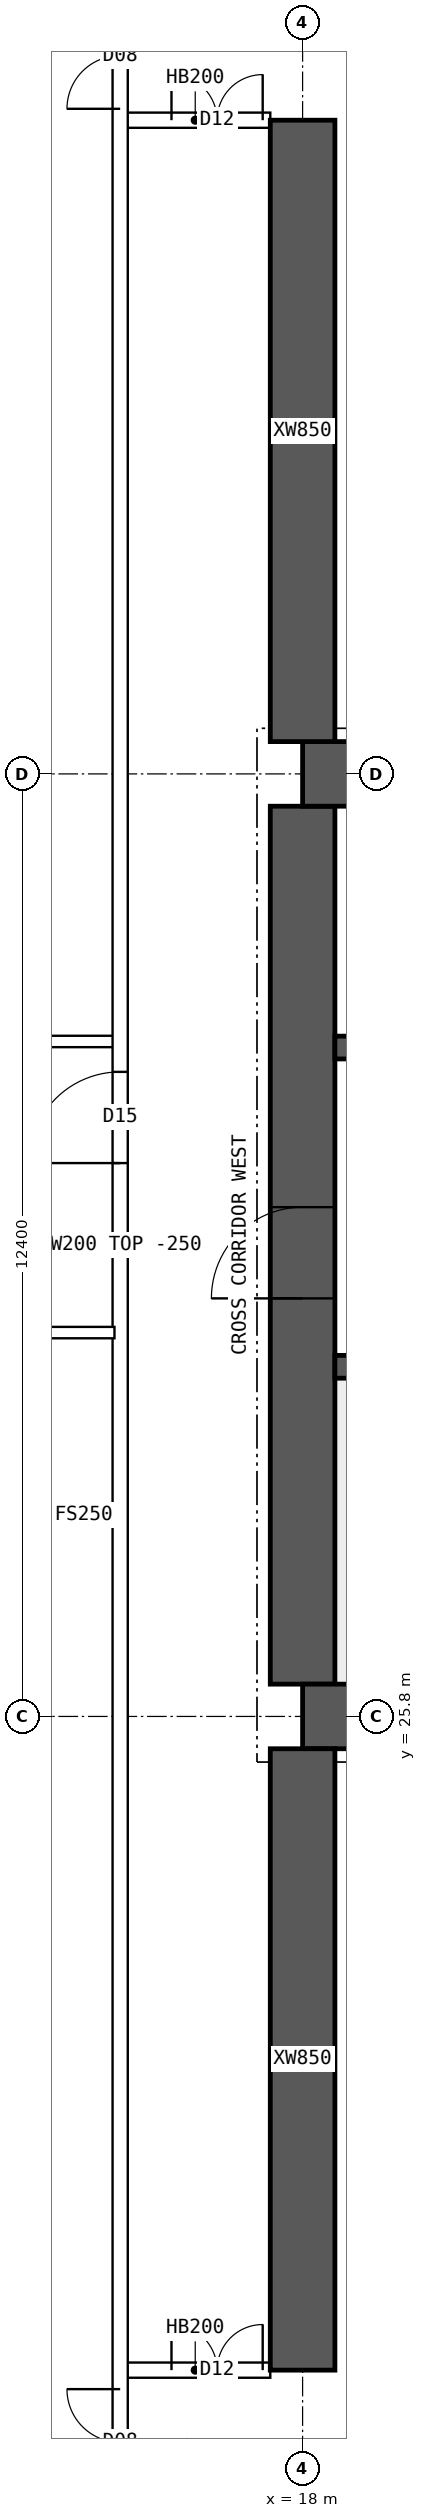
"""IFC4 building model, lengths in metres.
Left out: names, types, materials, properties, quantities, classifications, styles, units other than length and angle.
Written with IfcOpenShell. Run it as: python <this file> out.ifc"""

import sys

from ifc_helpers import new_model, si_unit, direction, frame, frame_2d, origin, place, context, subcontext, project, spatial, polyline, rectangle, outline, extrude, element, fill, save


model = new_model("IFC4")
c1 = context("Model", 3, precision=1e-05, world=origin(), true_north=direction((0.0, 1.0)))
c2 = subcontext(c1, "Body", "Model", "MODEL_VIEW")
j1 = project(units=[si_unit("LENGTHUNIT", "METRE"), si_unit("PLANEANGLEUNIT", "RADIAN")], contexts=[c1])
p1 = place(None, origin())
s1 = spatial("IfcSite", under=j1, at=p1, CompositionType="ELEMENT")
p2 = place(p1, origin())
s2 = spatial("IfcBuilding", under=s1, at=p2, CompositionType="ELEMENT")
p3 = place(p2, frame((0.0, 0.0, 186.1)))
s3 = spatial("IfcBuildingStorey", under=s2, at=p3, CompositionType="ELEMENT", Elevation=186.1)
for number, where, z_axis, x_axis in (
    (1, (18.0, 25.8, 0.0), (0.0, 0.0, 1.0), (1.0, 0.0, 0.0)),
    (2, (18.0, 38.2, 0.0), (0.0, 0.0, 1.0), (1.0, 0.0, 0.0)),
):
    element("IfcWall", number, at=place(p3, frame(where, z_axis=z_axis, x_axis=x_axis)), inside=s3, PredefinedType="SHEAR", context=c2, shape_type="SweptSolid", body=[
        extrude(rectangle(XDim=48.0, YDim=0.85, at=frame_2d((24.0, 0.0))), origin(), (0.0, 0.0, 1.0), 3.75),
    ])
p4 = place(p3, frame((18.0, 26.225, 0.0), z_axis=(0.0, 0.0, 1.0), x_axis=(0.0, 1.0, 0.0)))
e3 = element("IfcWall", 3, at=p4, inside=s3, PredefinedType="SHEAR", context=c2, shape_type="SweptSolid", body=[
    extrude(rectangle(XDim=11.55, YDim=0.85, at=frame_2d((5.775, 0.0))), origin(), (0.0, 0.0, 1.0), 3.75),
])
p5 = place(p4, frame((5.075, 0.0, 0.0)))
e4 = element("IfcOpeningElement", 4, at=p5, cuts=e3, PredefinedType="OPENING", context=c2, shape_type="SweptSolid", body=[
    extrude(rectangle(XDim=1.2, YDim=2.1, at=frame_2d((0.6, 1.05))), frame((0.0, 0.435, 0.0), z_axis=(0.0, -1.0, 0.0), x_axis=(1.0, 0.0, 0.0)), (0.0, 0.0, 1.0), 0.87),
])
p6 = place(p3, frame((18.425, 30.4, 0.0), z_axis=(0.0, 0.0, 1.0), x_axis=(1.0, 0.0, 0.0)))
e5 = element("IfcWall", 5, at=p6, inside=s3, PredefinedType="SHEAR", context=c2, shape_type="SweptSolid", body=[
    extrude(rectangle(XDim=47.15, YDim=0.3, at=frame_2d((23.575, 0.0))), origin(), (0.0, 0.0, 1.0), 3.75),
])
p7 = place(p6, frame((0.4, 0.0, 0.0)))
e6 = element("IfcOpeningElement", 6, at=p7, cuts=e5, PredefinedType="OPENING", context=c2, shape_type="SweptSolid", body=[
    extrude(rectangle(XDim=1.0, YDim=2.1, at=frame_2d((0.5, 1.05))), frame((0.0, 0.16, 0.0), z_axis=(0.0, -1.0, 0.0), x_axis=(1.0, 0.0, 0.0)), (0.0, 0.0, 1.0), 0.32),
])
p8 = place(p6, frame((45.75, 0.0, 0.0)))
e7 = element("IfcOpeningElement", 7, at=p8, cuts=e5, PredefinedType="OPENING", context=c2, shape_type="SweptSolid", body=[
    extrude(rectangle(XDim=1.0, YDim=2.1, at=frame_2d((0.5, 1.05))), frame((0.0, 0.16, 0.0), z_axis=(0.0, -1.0, 0.0), x_axis=(1.0, 0.0, 0.0)), (0.0, 0.0, 1.0), 0.32),
])
p9 = place(p6, frame((8.325, 0.0, 0.0)))
e8 = element("IfcOpeningElement", 8, at=p9, cuts=e5, PredefinedType="OPENING", context=c2, shape_type="SweptSolid", body=[
    extrude(rectangle(XDim=1.1, YDim=2.1, at=frame_2d((0.55, 1.05))), frame((0.0, 0.16, 0.0), z_axis=(0.0, -1.0, 0.0), x_axis=(1.0, 0.0, 0.0)), (0.0, 0.0, 1.0), 0.32),
])
p10 = place(p6, frame((10.925, 0.0, 0.0)))
e9 = element("IfcOpeningElement", 9, at=p10, cuts=e5, PredefinedType="OPENING", context=c2, shape_type="SweptSolid", body=[
    extrude(rectangle(XDim=1.1, YDim=2.1, at=frame_2d((0.55, 1.05))), frame((0.0, 0.16, 0.0), z_axis=(0.0, -1.0, 0.0), x_axis=(1.0, 0.0, 0.0)), (0.0, 0.0, 1.0), 0.32),
])
p11 = place(p6, frame((13.525, 0.0, 0.0)))
e10 = element("IfcOpeningElement", 10, at=p11, cuts=e5, PredefinedType="OPENING", context=c2, shape_type="SweptSolid", body=[
    extrude(rectangle(XDim=1.1, YDim=2.1, at=frame_2d((0.55, 1.05))), frame((0.0, 0.16, 0.0), z_axis=(0.0, -1.0, 0.0), x_axis=(1.0, 0.0, 0.0)), (0.0, 0.0, 1.0), 0.32),
])
p12 = place(p6, frame((16.125, 0.0, 0.0)))
e11 = element("IfcOpeningElement", 11, at=p12, cuts=e5, PredefinedType="OPENING", context=c2, shape_type="SweptSolid", body=[
    extrude(rectangle(XDim=1.1, YDim=2.1, at=frame_2d((0.55, 1.05))), frame((0.0, 0.16, 0.0), z_axis=(0.0, -1.0, 0.0), x_axis=(1.0, 0.0, 0.0)), (0.0, 0.0, 1.0), 0.32),
])
p13 = place(p6, frame((18.9, 0.0, 0.0)))
e12 = element("IfcOpeningElement", 12, at=p13, cuts=e5, PredefinedType="OPENING", context=c2, shape_type="SweptSolid", body=[
    extrude(rectangle(XDim=0.9, YDim=2.1, at=frame_2d((0.45, 1.05))), frame((0.0, 0.16, 0.0), z_axis=(0.0, -1.0, 0.0), x_axis=(1.0, 0.0, 0.0)), (0.0, 0.0, 1.0), 0.32),
])
p14 = place(p6, frame((30.192, 0.0, 0.0)))
e13 = element("IfcOpeningElement", 13, at=p14, cuts=e5, PredefinedType="OPENING", context=c2, shape_type="SweptSolid", body=[
    extrude(rectangle(XDim=1.1, YDim=2.1, at=frame_2d((0.55, 1.05))), frame((0.0, 0.16, 0.0), z_axis=(0.0, -1.0, 0.0), x_axis=(1.0, 0.0, 0.0)), (0.0, 0.0, 1.0), 0.32),
])
p15 = place(p6, frame((33.725, 0.0, 0.0)))
e14 = element("IfcOpeningElement", 14, at=p15, cuts=e5, PredefinedType="OPENING", context=c2, shape_type="SweptSolid", body=[
    extrude(rectangle(XDim=1.1, YDim=2.1, at=frame_2d((0.55, 1.05))), frame((0.0, 0.16, 0.0), z_axis=(0.0, -1.0, 0.0), x_axis=(1.0, 0.0, 0.0)), (0.0, 0.0, 1.0), 0.32),
])
p16 = place(p6, frame((37.258, 0.0, 0.0)))
e15 = element("IfcOpeningElement", 15, at=p16, cuts=e5, PredefinedType="OPENING", context=c2, shape_type="SweptSolid", body=[
    extrude(rectangle(XDim=1.1, YDim=2.1, at=frame_2d((0.55, 1.05))), frame((0.0, 0.16, 0.0), z_axis=(0.0, -1.0, 0.0), x_axis=(1.0, 0.0, 0.0)), (0.0, 0.0, 1.0), 0.32),
])
p17 = place(p3, frame((18.425, 34.6, 0.0), z_axis=(0.0, 0.0, 1.0), x_axis=(1.0, 0.0, 0.0)))
e16 = element("IfcWall", 16, at=p17, inside=s3, PredefinedType="SHEAR", context=c2, shape_type="SweptSolid", body=[
    extrude(rectangle(XDim=47.15, YDim=0.3, at=frame_2d((23.575, 0.0))), origin(), (0.0, 0.0, 1.0), 3.75),
])
p18 = place(p17, frame((0.9, 0.0, 0.0)))
e17 = element("IfcOpeningElement", 17, at=p18, cuts=e16, PredefinedType="OPENING", context=c2, shape_type="SweptSolid", body=[
    extrude(rectangle(XDim=1.1, YDim=2.1, at=frame_2d((0.55, 1.05))), frame((0.0, 0.16, 0.0), z_axis=(0.0, -1.0, 0.0), x_axis=(1.0, 0.0, 0.0)), (0.0, 0.0, 1.0), 0.32),
])
p19 = place(p17, frame((45.15, 0.0, 0.0)))
e18 = element("IfcOpeningElement", 18, at=p19, cuts=e16, PredefinedType="OPENING", context=c2, shape_type="SweptSolid", body=[
    extrude(rectangle(XDim=1.1, YDim=2.1, at=frame_2d((0.55, 1.05))), frame((0.0, 0.16, 0.0), z_axis=(0.0, -1.0, 0.0), x_axis=(1.0, 0.0, 0.0)), (0.0, 0.0, 1.0), 0.32),
])
p20 = place(p17, frame((4.175, 0.0, 0.0)))
e19 = element("IfcOpeningElement", 19, at=p20, cuts=e16, PredefinedType="OPENING", context=c2, shape_type="SweptSolid", body=[
    extrude(rectangle(XDim=0.9, YDim=2.1, at=frame_2d((0.45, 1.05))), frame((0.0, 0.16, 0.0), z_axis=(0.0, -1.0, 0.0), x_axis=(1.0, 0.0, 0.0)), (0.0, 0.0, 1.0), 0.32),
])
p21 = place(p17, frame((42.075, 0.0, 0.0)))
e20 = element("IfcOpeningElement", 20, at=p21, cuts=e16, PredefinedType="OPENING", context=c2, shape_type="SweptSolid", body=[
    extrude(rectangle(XDim=0.9, YDim=2.1, at=frame_2d((0.45, 1.05))), frame((0.0, 0.16, 0.0), z_axis=(0.0, -1.0, 0.0), x_axis=(1.0, 0.0, 0.0)), (0.0, 0.0, 1.0), 0.32),
])
p22 = place(p17, frame((8.95, 0.0, 0.0)))
e21 = element("IfcOpeningElement", 21, at=p22, cuts=e16, PredefinedType="OPENING", context=c2, shape_type="SweptSolid", body=[
    extrude(rectangle(XDim=0.9, YDim=2.1, at=frame_2d((0.45, 1.05))), frame((0.0, 0.16, 0.0), z_axis=(0.0, -1.0, 0.0), x_axis=(1.0, 0.0, 0.0)), (0.0, 0.0, 1.0), 0.32),
])
p23 = place(p17, frame((12.924, 0.0, 0.0)))
e22 = element("IfcOpeningElement", 22, at=p23, cuts=e16, PredefinedType="OPENING", context=c2, shape_type="SweptSolid", body=[
    extrude(rectangle(XDim=0.9, YDim=2.1, at=frame_2d((0.45, 1.05))), frame((0.0, 0.16, 0.0), z_axis=(0.0, -1.0, 0.0), x_axis=(1.0, 0.0, 0.0)), (0.0, 0.0, 1.0), 0.32),
])
p24 = place(p17, frame((16.571, 0.0, 0.0)))
e23 = element("IfcOpeningElement", 23, at=p24, cuts=e16, PredefinedType="OPENING", context=c2, shape_type="SweptSolid", body=[
    extrude(rectangle(XDim=0.9, YDim=2.1, at=frame_2d((0.45, 1.05))), frame((0.0, 0.16, 0.0), z_axis=(0.0, -1.0, 0.0), x_axis=(1.0, 0.0, 0.0)), (0.0, 0.0, 1.0), 0.32),
])
p25 = place(p17, frame((20.33, 0.0, 0.0)))
e24 = element("IfcOpeningElement", 24, at=p25, cuts=e16, PredefinedType="OPENING", context=c2, shape_type="SweptSolid", body=[
    extrude(rectangle(XDim=0.9, YDim=2.1, at=frame_2d((0.45, 1.05))), frame((0.0, 0.16, 0.0), z_axis=(0.0, -1.0, 0.0), x_axis=(1.0, 0.0, 0.0)), (0.0, 0.0, 1.0), 0.32),
])
p26 = place(p17, frame((24.736, 0.0, 0.0)))
e25 = element("IfcOpeningElement", 25, at=p26, cuts=e16, PredefinedType="OPENING", context=c2, shape_type="SweptSolid", body=[
    extrude(rectangle(XDim=0.9, YDim=2.1, at=frame_2d((0.45, 1.05))), frame((0.0, 0.16, 0.0), z_axis=(0.0, -1.0, 0.0), x_axis=(1.0, 0.0, 0.0)), (0.0, 0.0, 1.0), 0.32),
])
p27 = place(p17, frame((27.533, 0.0, 0.0)))
e26 = element("IfcOpeningElement", 26, at=p27, cuts=e16, PredefinedType="OPENING", context=c2, shape_type="SweptSolid", body=[
    extrude(rectangle(XDim=0.9, YDim=2.1, at=frame_2d((0.45, 1.05))), frame((0.0, 0.16, 0.0), z_axis=(0.0, -1.0, 0.0), x_axis=(1.0, 0.0, 0.0)), (0.0, 0.0, 1.0), 0.32),
])
p28 = place(p17, frame((30.716, 0.0, 0.0)))
e27 = element("IfcOpeningElement", 27, at=p28, cuts=e16, PredefinedType="OPENING", context=c2, shape_type="SweptSolid", body=[
    extrude(rectangle(XDim=0.9, YDim=2.1, at=frame_2d((0.45, 1.05))), frame((0.0, 0.16, 0.0), z_axis=(0.0, -1.0, 0.0), x_axis=(1.0, 0.0, 0.0)), (0.0, 0.0, 1.0), 0.32),
])
p29 = place(p17, frame((34.667, 0.0, 0.0)))
e28 = element("IfcOpeningElement", 28, at=p29, cuts=e16, PredefinedType="OPENING", context=c2, shape_type="SweptSolid", body=[
    extrude(rectangle(XDim=0.9, YDim=2.1, at=frame_2d((0.45, 1.05))), frame((0.0, 0.16, 0.0), z_axis=(0.0, -1.0, 0.0), x_axis=(1.0, 0.0, 0.0)), (0.0, 0.0, 1.0), 0.32),
])
p30 = place(p17, frame((37.605, 0.0, 0.0)))
e29 = element("IfcOpeningElement", 29, at=p30, cuts=e16, PredefinedType="OPENING", context=c2, shape_type="SweptSolid", body=[
    extrude(rectangle(XDim=0.9, YDim=2.1, at=frame_2d((0.45, 1.05))), frame((0.0, 0.16, 0.0), z_axis=(0.0, -1.0, 0.0), x_axis=(1.0, 0.0, 0.0)), (0.0, 0.0, 1.0), 0.32),
])
for number, where, z_axis, x_axis in (
    (30, (18.0, 17.2, 0.0), (0.0, 0.0, 1.0), (0.0, 1.0, 0.0)),
    (31, (18.0, 38.625, 0.0), (0.0, 0.0, 1.0), (0.0, 1.0, 0.0)),
):
    element("IfcWall", number, at=place(p3, frame(where, z_axis=z_axis, x_axis=x_axis)), inside=s3, PredefinedType="SHEAR", context=c2, shape_type="SweptSolid", body=[
        extrude(rectangle(XDim=8.175, YDim=0.85, at=frame_2d((4.087, 0.0))), origin(), (0.0, 0.0, 1.0), 3.75),
    ])
p31 = place(p3, frame((15.6, 17.2, 0.0), z_axis=(0.0, 0.0, 1.0), x_axis=(1.0, 0.0, 0.0)))
e32 = element("IfcWall", 32, at=p31, inside=s3, PredefinedType="SOLIDWALL", context=c2, shape_type="SweptSolid", body=[
    extrude(rectangle(XDim=1.975, YDim=0.2, at=frame_2d((0.987, 0.0))), origin(), (0.0, 0.0, 1.0), 3.5),
])
p32 = place(p31, frame((0.675, 0.0, 0.0)))
e33 = element("IfcOpeningElement", 33, at=p32, cuts=e32, PredefinedType="OPENING", context=c2, shape_type="SweptSolid", body=[
    extrude(rectangle(XDim=1.2, YDim=2.1, at=frame_2d((0.6, 1.05))), frame((0.0, 0.11, 0.0), z_axis=(0.0, -1.0, 0.0), x_axis=(1.0, 0.0, 0.0)), (0.0, 0.0, 1.0), 0.22),
])
p33 = place(p3, frame((15.6, 46.8, 0.0), z_axis=(0.0, 0.0, 1.0), x_axis=(1.0, 0.0, 0.0)))
e34 = element("IfcWall", 34, at=p33, inside=s3, PredefinedType="SOLIDWALL", context=c2, shape_type="SweptSolid", body=[
    extrude(rectangle(XDim=1.975, YDim=0.2, at=frame_2d((0.987, 0.0))), origin(), (0.0, 0.0, 1.0), 3.5),
])
p34 = place(p33, frame((0.675, 0.0, 0.0)))
e35 = element("IfcOpeningElement", 35, at=p34, cuts=e34, PredefinedType="OPENING", context=c2, shape_type="SweptSolid", body=[
    extrude(rectangle(XDim=1.2, YDim=2.1, at=frame_2d((0.6, 1.05))), frame((0.0, 0.11, 0.0), z_axis=(0.0, -1.0, 0.0), x_axis=(1.0, 0.0, 0.0)), (0.0, 0.0, 1.0), 0.22),
])
p35 = place(p3, frame((8.705, 30.85, 0.0), z_axis=(0.0, 0.0, 1.0), x_axis=(1.0, 0.0, 0.0)))
e36 = element("IfcWall", 36, at=p35, inside=s3, PredefinedType="PARTITIONING", context=c2, shape_type="SweptSolid", body=[
    extrude(outline(polyline([(0.0, 0.0), (6.82, 0.0), (6.82, 3.5), (3.597, 3.5), (3.595, 3.05), (2.997, 3.05), (2.995, 3.5), (0.0, 3.5), (0.0, 0.0)])), frame((0.0, 0.075, 0.0), z_axis=(0.0, -1.0, 0.0), x_axis=(1.0, 0.0, 0.0)), (0.0, 0.0, 1.0), 0.15),
])
p36 = place(p3, frame((15.6, 10.446, 0.0), z_axis=(0.0, 0.0, 1.0), x_axis=(0.0, 1.0, 0.0)))
e37 = element("IfcWall", 37, at=p36, inside=s3, PredefinedType="SOLIDWALL", context=c2, shape_type="SweptSolid", body=[
    extrude(rectangle(XDim=43.107, YDim=0.2, at=frame_2d((21.554, 0.0))), origin(), (0.0, 0.0, 1.0), 3.5),
])
p37 = place(p36, frame((22.634, 0.0, 0.0)))
e38 = element("IfcOpeningElement", 38, at=p37, cuts=e37, PredefinedType="OPENING", context=c2, shape_type="SweptSolid", body=[
    extrude(rectangle(XDim=1.2, YDim=2.1, at=frame_2d((0.6, 1.05))), frame((0.0, 0.11, 0.0), z_axis=(0.0, -1.0, 0.0), x_axis=(1.0, 0.0, 0.0)), (0.0, 0.0, 1.0), 0.22),
])
p38 = place(p36, frame((5.104, 0.0, 0.0)))
e39 = element("IfcOpeningElement", 39, at=p38, cuts=e37, PredefinedType="OPENING", context=c2, shape_type="SweptSolid", body=[
    extrude(rectangle(XDim=1.4, YDim=2.1, at=frame_2d((0.7, 1.05))), frame((0.0, 0.11, 0.0), z_axis=(0.0, -1.0, 0.0), x_axis=(1.0, 0.0, 0.0)), (0.0, 0.0, 1.0), 0.22),
])
p39 = place(p36, frame((36.504, 0.0, 0.0)))
e40 = element("IfcOpeningElement", 40, at=p39, cuts=e37, PredefinedType="OPENING", context=c2, shape_type="SweptSolid", body=[
    extrude(rectangle(XDim=1.4, YDim=2.1, at=frame_2d((0.7, 1.05))), frame((0.0, 0.11, 0.0), z_axis=(0.0, -1.0, 0.0), x_axis=(1.0, 0.0, 0.0)), (0.0, 0.0, 1.0), 0.22),
])
p40 = place(p3, frame((8.705, 34.68, 0.0), z_axis=(0.0, 0.0, 1.0), x_axis=(1.0, 0.0, 0.0)))
e41 = element("IfcWall", 41, at=p40, inside=s3, PredefinedType="PARTITIONING", context=c2, shape_type="SweptSolid", body=[
    extrude(outline(polyline([(0.0, 0.0), (6.82, 0.0), (6.82, 3.5), (3.597, 3.5), (3.595, 3.05), (2.997, 3.05), (2.995, 3.5), (0.0, 3.5), (0.0, 0.0)])), frame((0.0, 0.075, 0.0), z_axis=(0.0, -1.0, 0.0), x_axis=(1.0, 0.0, 0.0)), (0.0, 0.0, 1.0), 0.15),
])
p41 = place(p5, origin())
e42 = element("IfcDoor", 42, at=p41, inside=s3, OperationType="SINGLE_SWING_LEFT", PredefinedType="DOOR", context=c2, shape_type="SweptSolid", body=[
    extrude(rectangle(XDim=1.2, YDim=2.1, at=frame_2d((0.6, 1.05))), frame((0.0, 0.025, 0.0), z_axis=(0.0, -1.0, 0.0), x_axis=(1.0, 0.0, 0.0)), (0.0, 0.0, 1.0), 0.05),
])
fill(e4, e42)
p42 = place(p32, origin())
e43 = element("IfcDoor", 43, at=p42, inside=s3, OperationType="DOUBLE_DOOR_SINGLE_SWING", PredefinedType="DOOR", context=c2, shape_type="SweptSolid", body=[
    extrude(rectangle(XDim=1.2, YDim=2.1, at=frame_2d((0.6, 1.05))), frame((0.0, 0.025, 0.0), z_axis=(0.0, -1.0, 0.0), x_axis=(1.0, 0.0, 0.0)), (0.0, 0.0, 1.0), 0.05),
])
fill(e33, e43)
p43 = place(p34, origin())
e44 = element("IfcDoor", 44, at=p43, inside=s3, OperationType="DOUBLE_DOOR_SINGLE_SWING", PredefinedType="DOOR", context=c2, shape_type="SweptSolid", body=[
    extrude(rectangle(XDim=1.2, YDim=2.1, at=frame_2d((0.6, 1.05))), frame((0.0, 0.025, 0.0), z_axis=(0.0, -1.0, 0.0), x_axis=(1.0, 0.0, 0.0)), (0.0, 0.0, 1.0), 0.05),
])
fill(e35, e44)
p44 = place(p37, origin())
e45 = element("IfcDoor", 45, at=p44, inside=s3, OperationType="SINGLE_SWING_LEFT", PredefinedType="DOOR", context=c2, shape_type="SweptSolid", body=[
    extrude(rectangle(XDim=1.2, YDim=2.1, at=frame_2d((0.6, 1.05))), frame((0.0, 0.025, 0.0), z_axis=(0.0, -1.0, 0.0), x_axis=(1.0, 0.0, 0.0)), (0.0, 0.0, 1.0), 0.05),
])
fill(e38, e45)
p45 = place(p38, origin())
e46 = element("IfcDoor", 46, at=p45, inside=s3, OperationType="DOUBLE_DOOR_SINGLE_SWING", PredefinedType="DOOR", context=c2, shape_type="SweptSolid", body=[
    extrude(rectangle(XDim=1.4, YDim=2.1, at=frame_2d((0.7, 1.05))), frame((0.0, 0.025, 0.0), z_axis=(0.0, -1.0, 0.0), x_axis=(1.0, 0.0, 0.0)), (0.0, 0.0, 1.0), 0.05),
])
fill(e39, e46)
p46 = place(p39, origin())
e47 = element("IfcDoor", 47, at=p46, inside=s3, OperationType="DOUBLE_DOOR_SINGLE_SWING", PredefinedType="DOOR", context=c2, shape_type="SweptSolid", body=[
    extrude(rectangle(XDim=1.4, YDim=2.1, at=frame_2d((0.7, 1.05))), frame((0.0, 0.025, 0.0), z_axis=(0.0, -1.0, 0.0), x_axis=(1.0, 0.0, 0.0)), (0.0, 0.0, 1.0), 0.05),
])
fill(e40, e47)
save(model, sys.argv[1])
